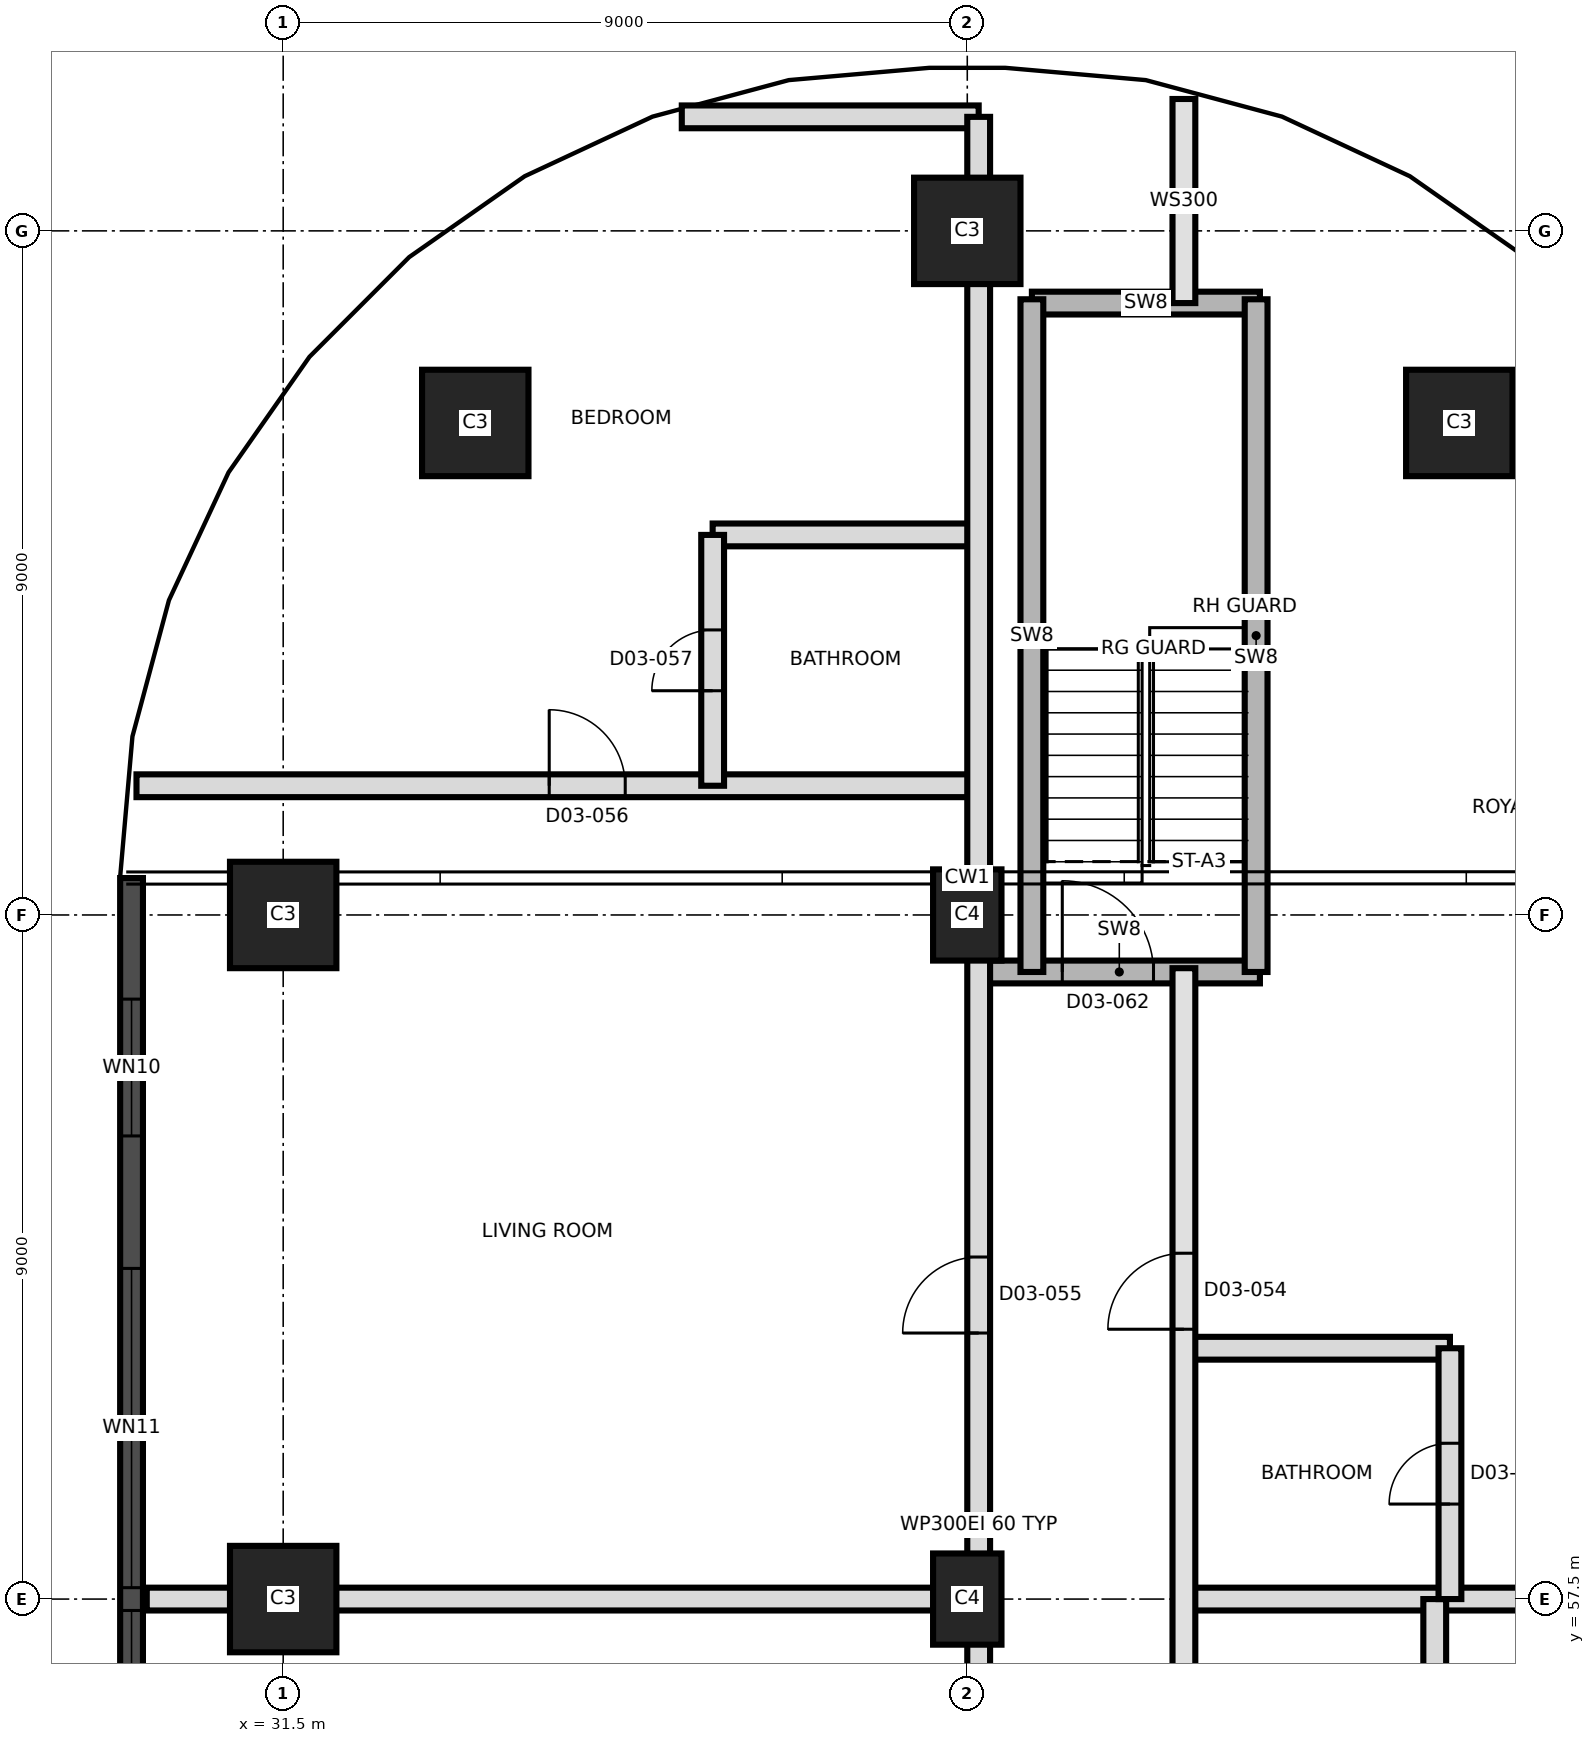
"""IFC4 building model, lengths in metres.
Left out: names, types, materials, properties, quantities, classifications, styles, units other than length and angle.
Written with IfcOpenShell. Run it as: python <this file> out.ifc"""

import sys

from ifc_helpers import new_model, si_unit, direction, frame, frame_2d, origin, origin_2d, place, context, subcontext, project, spatial, rectangle, extrude, element, fill, save


model = new_model("IFC4")
c1 = context("Model", 3, precision=1e-05, world=origin(), true_north=direction((0.0, 1.0)))
c2 = subcontext(c1, "Body", "Model", "MODEL_VIEW")
j1 = project(units=[si_unit("LENGTHUNIT", "METRE"), si_unit("PLANEANGLEUNIT", "RADIAN")], contexts=[c1])
p1 = place(None, origin())
s1 = spatial("IfcSite", under=j1, at=p1, CompositionType="ELEMENT")
p2 = place(p1, origin())
s2 = spatial("IfcBuilding", under=s1, at=p2, CompositionType="ELEMENT")
p3 = place(p2, frame((0.0, 0.0, 52.0)))
s3 = spatial("IfcBuildingStorey", under=s2, at=p3, CompositionType="ELEMENT", Elevation=52.0)
p4 = place(p3, frame((31.5, 57.5, 0.0), z_axis=(0.0, 0.0, 1.0), x_axis=(1.0, 0.0, 0.0)))
e1 = element("IfcColumn", 1, at=p4, inside=s3, PredefinedType="COLUMN", context=c2, shape_type="SweptSolid", body=[
    extrude(rectangle(XDim=1.4, YDim=1.4, at=origin_2d()), origin(), (0.0, 0.0, 1.0), 3.7),
])
p5 = place(p3, frame((40.5, 57.5, 0.0), z_axis=(0.0, 0.0, 1.0), x_axis=(0.0, 1.0, 0.0)))
e2 = element("IfcColumn", 2, at=p5, inside=s3, PredefinedType="COLUMN", context=c2, shape_type="SweptSolid", body=[
    extrude(rectangle(XDim=1.2, YDim=0.9, at=origin_2d()), origin(), (0.0, 0.0, 1.0), 3.7),
])
p6 = place(p3, frame((31.5, 66.5, 0.0), z_axis=(0.0, 0.0, 1.0), x_axis=(1.0, 0.0, 0.0)))
e3 = element("IfcColumn", 3, at=p6, inside=s3, PredefinedType="COLUMN", context=c2, shape_type="SweptSolid", body=[
    extrude(rectangle(XDim=1.4, YDim=1.4, at=origin_2d()), origin(), (0.0, 0.0, 1.0), 3.7),
])
p7 = place(p3, frame((40.5, 66.5, 0.0), z_axis=(0.0, 0.0, 1.0), x_axis=(0.0, 1.0, 0.0)))
e4 = element("IfcColumn", 4, at=p7, inside=s3, PredefinedType="COLUMN", context=c2, shape_type="SweptSolid", body=[
    extrude(rectangle(XDim=1.2, YDim=0.9, at=origin_2d()), origin(), (0.0, 0.0, 1.0), 3.7),
])
for number, where, z_axis, x_axis in (
    (5, (34.027, 72.973, 0.0), (0.0, 0.0, 1.0), (1.0, 0.0, 0.0)),
    (6, (46.973, 72.973, 0.0), (0.0, 0.0, 1.0), (1.0, 0.0, 0.0)),
    (7, (40.5, 75.5, 0.0), (0.0, 0.0, 1.0), (1.0, 0.0, 0.0)),
):
    element("IfcColumn", number, at=place(p3, frame(where, z_axis=z_axis, x_axis=x_axis)), inside=s3, PredefinedType="COLUMN", context=c2, shape_type="SweptSolid", body=[
        extrude(rectangle(XDim=1.4, YDim=1.4, at=origin_2d()), origin(), (0.0, 0.0, 1.0), 3.7),
    ])
p8 = place(p3, frame((29.505, 66.986, 0.0), z_axis=(0.0, 0.0, 1.0), x_axis=(0.0, -1.0, 0.0)))
e8 = element("IfcWall", 8, at=p8, inside=s3, PredefinedType="SOLIDWALL", context=c2, shape_type="SweptSolid", body=[
    extrude(rectangle(XDim=32.976, YDim=0.3, at=frame_2d((16.488, 0.0))), origin(), (0.0, 0.0, 1.0), 3.4),
])
p9 = place(p8, frame((1.593, 0.0, 0.3)))
e9 = element("IfcOpeningElement", 9, at=p9, cuts=e8, PredefinedType="OPENING", context=c2, shape_type="SweptSolid", body=[
    extrude(rectangle(XDim=1.8, YDim=2.4, at=frame_2d((0.9, 1.2))), frame((0.0, 0.16, 0.0), z_axis=(0.0, -1.0, 0.0), x_axis=(1.0, 0.0, 0.0)), (0.0, 0.0, 1.0), 0.32),
])
p10 = place(p8, frame((5.136, 0.0, 0.9)))
e10 = element("IfcOpeningElement", 10, at=p10, cuts=e8, PredefinedType="OPENING", context=c2, shape_type="SweptSolid", body=[
    extrude(rectangle(XDim=4.2, YDim=1.5, at=frame_2d((2.1, 0.75))), frame((0.0, 0.16, 0.0), z_axis=(0.0, -1.0, 0.0), x_axis=(1.0, 0.0, 0.0)), (0.0, 0.0, 1.0), 0.32),
])
p11 = place(p8, frame((9.636, 0.0, 0.9)))
e11 = element("IfcOpeningElement", 11, at=p11, cuts=e8, PredefinedType="OPENING", context=c2, shape_type="SweptSolid", body=[
    extrude(rectangle(XDim=4.2, YDim=1.5, at=frame_2d((2.1, 0.75))), frame((0.0, 0.16, 0.0), z_axis=(0.0, -1.0, 0.0), x_axis=(1.0, 0.0, 0.0)), (0.0, 0.0, 1.0), 0.32),
])
p12 = place(p8, frame((14.136, 0.0, 0.9)))
e12 = element("IfcOpeningElement", 12, at=p12, cuts=e8, PredefinedType="OPENING", context=c2, shape_type="SweptSolid", body=[
    extrude(rectangle(XDim=4.2, YDim=1.5, at=frame_2d((2.1, 0.75))), frame((0.0, 0.16, 0.0), z_axis=(0.0, -1.0, 0.0), x_axis=(1.0, 0.0, 0.0)), (0.0, 0.0, 1.0), 0.32),
])
p13 = place(p8, frame((18.636, 0.0, 0.9)))
e13 = element("IfcOpeningElement", 13, at=p13, cuts=e8, PredefinedType="OPENING", context=c2, shape_type="SweptSolid", body=[
    extrude(rectangle(XDim=4.2, YDim=1.5, at=frame_2d((2.1, 0.75))), frame((0.0, 0.16, 0.0), z_axis=(0.0, -1.0, 0.0), x_axis=(1.0, 0.0, 0.0)), (0.0, 0.0, 1.0), 0.32),
])
p14 = place(p8, frame((23.136, 0.0, 0.9)))
e14 = element("IfcOpeningElement", 14, at=p14, cuts=e8, PredefinedType="OPENING", context=c2, shape_type="SweptSolid", body=[
    extrude(rectangle(XDim=4.2, YDim=1.5, at=frame_2d((2.1, 0.75))), frame((0.0, 0.16, 0.0), z_axis=(0.0, -1.0, 0.0), x_axis=(1.0, 0.0, 0.0)), (0.0, 0.0, 1.0), 0.32),
])
p15 = place(p8, frame((29.331, 0.0, 0.3)))
e15 = element("IfcOpeningElement", 15, at=p15, cuts=e8, PredefinedType="OPENING", context=c2, shape_type="SweptSolid", body=[
    extrude(rectangle(XDim=1.8, YDim=2.4, at=frame_2d((0.9, 1.2))), frame((0.0, 0.16, 0.0), z_axis=(0.0, -1.0, 0.0), x_axis=(1.0, 0.0, 0.0)), (0.0, 0.0, 1.0), 0.32),
])
p16 = place(p3, frame((29.705, 57.5, 0.0), z_axis=(0.0, 0.0, 1.0), x_axis=(1.0, 0.0, 0.0)))
e16 = element("IfcWall", 16, at=p16, inside=s3, PredefinedType="PARTITIONING", context=c2, shape_type="SweptSolid", body=[
    extrude(rectangle(XDim=10.945, YDim=0.3, at=frame_2d((5.472, 0.0))), origin(), (0.0, 0.0, 1.0), 3.4),
])
p17 = place(p3, frame((43.35, 57.5, 0.0), z_axis=(0.0, 0.0, 1.0), x_axis=(1.0, 0.0, 0.0)))
e17 = element("IfcWall", 17, at=p17, inside=s3, PredefinedType="PARTITIONING", context=c2, shape_type="SweptSolid", body=[
    extrude(rectangle(XDim=8.125, YDim=0.3, at=frame_2d((4.062, 0.0))), origin(), (0.0, 0.0, 1.0), 3.4),
])
p18 = place(p3, frame((43.35, 60.8, 0.0), z_axis=(0.0, 0.0, 1.0), x_axis=(1.0, 0.0, 0.0)))
e18 = element("IfcWall", 18, at=p18, inside=s3, PredefinedType="PARTITIONING", context=c2, shape_type="SweptSolid", body=[
    extrude(rectangle(XDim=3.5, YDim=0.3, at=frame_2d((1.75, 0.0))), origin(), (0.0, 0.0, 1.0), 3.4),
])
p19 = place(p3, frame((40.65, 65.75, 0.0), z_axis=(0.0, 0.0, 1.0), x_axis=(1.0, 0.0, 0.0)))
e19 = element("IfcWall", 19, at=p19, inside=s3, PredefinedType="SHEAR", context=c2, shape_type="SweptSolid", body=[
    extrude(rectangle(XDim=3.7, YDim=0.3, at=frame_2d((1.85, 0.0))), origin(), (0.0, 0.0, 1.0), 3.4),
])
p20 = place(p19, frame((1.1, 0.0, 0.0)))
e20 = element("IfcOpeningElement", 20, at=p20, cuts=e19, PredefinedType="OPENING", context=c2, shape_type="SweptSolid", body=[
    extrude(rectangle(XDim=1.2, YDim=2.1, at=frame_2d((0.6, 1.05))), frame((0.0, 0.16, 0.0), z_axis=(0.0, -1.0, 0.0), x_axis=(1.0, 0.0, 0.0)), (0.0, 0.0, 1.0), 0.32),
])
p21 = place(p3, frame((29.57, 68.2, 0.0), z_axis=(0.0, 0.0, 1.0), x_axis=(1.0, 0.0, 0.0)))
e21 = element("IfcWall", 21, at=p21, inside=s3, PredefinedType="PARTITIONING", context=c2, shape_type="SweptSolid", body=[
    extrude(rectangle(XDim=11.08, YDim=0.3, at=frame_2d((5.54, 0.0))), origin(), (0.0, 0.0, 1.0), 3.4),
])
p22 = place(p21, frame((5.43, 0.0, 0.0)))
e22 = element("IfcOpeningElement", 22, at=p22, cuts=e21, PredefinedType="OPENING", context=c2, shape_type="SweptSolid", body=[
    extrude(rectangle(XDim=1.0, YDim=2.1, at=frame_2d((0.5, 1.05))), frame((0.0, 0.16, 0.0), z_axis=(0.0, -1.0, 0.0), x_axis=(1.0, 0.0, 0.0)), (0.0, 0.0, 1.0), 0.32),
])
p23 = place(p3, frame((37.15, 71.5, 0.0), z_axis=(0.0, 0.0, 1.0), x_axis=(1.0, 0.0, 0.0)))
e23 = element("IfcWall", 23, at=p23, inside=s3, PredefinedType="PARTITIONING", context=c2, shape_type="SweptSolid", body=[
    extrude(rectangle(XDim=3.5, YDim=0.3, at=frame_2d((1.75, 0.0))), origin(), (0.0, 0.0, 1.0), 3.4),
])
p24 = place(p3, frame((41.35, 74.55, 0.0), z_axis=(0.0, 0.0, 1.0), x_axis=(1.0, 0.0, 0.0)))
e24 = element("IfcWall", 24, at=p24, inside=s3, PredefinedType="SHEAR", context=c2, shape_type="SweptSolid", body=[
    extrude(rectangle(XDim=3.0, YDim=0.3, at=frame_2d((1.5, 0.0))), origin(), (0.0, 0.0, 1.0), 3.4),
])
p25 = place(p3, frame((36.744, 77.0, 0.0), z_axis=(0.0, 0.0, 1.0), x_axis=(1.0, 0.0, 0.0)))
e25 = element("IfcWall", 25, at=p25, inside=s3, PredefinedType="PARTITIONING", context=c2, shape_type="SweptSolid", body=[
    extrude(rectangle(XDim=3.906, YDim=0.3, at=frame_2d((1.953, 0.0))), origin(), (0.0, 0.0, 1.0), 3.4),
])
p26 = place(p3, frame((37.15, 68.2, 0.0), z_axis=(0.0, 0.0, 1.0), x_axis=(0.0, 1.0, 0.0)))
e26 = element("IfcWall", 26, at=p26, inside=s3, PredefinedType="PARTITIONING", context=c2, shape_type="SweptSolid", body=[
    extrude(rectangle(XDim=3.3, YDim=0.3, at=frame_2d((1.65, 0.0))), origin(), (0.0, 0.0, 1.0), 3.4),
])
p27 = place(p26, frame((1.25, 0.0, 0.0)))
e27 = element("IfcOpeningElement", 27, at=p27, cuts=e26, PredefinedType="OPENING", context=c2, shape_type="SweptSolid", body=[
    extrude(rectangle(XDim=0.8, YDim=2.1, at=frame_2d((0.4, 1.05))), frame((0.0, 0.16, 0.0), z_axis=(0.0, -1.0, 0.0), x_axis=(1.0, 0.0, 0.0)), (0.0, 0.0, 1.0), 0.32),
])
p28 = place(p3, frame((40.65, 39.95, 0.0), z_axis=(0.0, 0.0, 1.0), x_axis=(0.0, 1.0, 0.0)))
e28 = element("IfcWall", 28, at=p28, inside=s3, PredefinedType="PARTITIONING", context=c2, shape_type="SweptSolid", body=[
    extrude(rectangle(XDim=37.05, YDim=0.3, at=frame_2d((18.525, 0.0))), origin(), (0.0, 0.0, 1.0), 3.4),
])
p29 = place(p28, frame((1.9, 0.0, 0.0)))
e29 = element("IfcOpeningElement", 29, at=p29, cuts=e28, PredefinedType="OPENING", context=c2, shape_type="SweptSolid", body=[
    extrude(rectangle(XDim=1.0, YDim=2.4, at=frame_2d((0.5, 1.2))), frame((0.0, 0.16, 0.0), z_axis=(0.0, -1.0, 0.0), x_axis=(1.0, 0.0, 0.0)), (0.0, 0.0, 1.0), 0.32),
])
p30 = place(p28, frame((14.2, 0.0, 0.0)))
e30 = element("IfcOpeningElement", 30, at=p30, cuts=e28, PredefinedType="OPENING", context=c2, shape_type="SweptSolid", body=[
    extrude(rectangle(XDim=1.0, YDim=2.4, at=frame_2d((0.5, 1.2))), frame((0.0, 0.16, 0.0), z_axis=(0.0, -1.0, 0.0), x_axis=(1.0, 0.0, 0.0)), (0.0, 0.0, 1.0), 0.32),
])
p31 = place(p28, frame((21.05, 0.0, 0.0)))
e31 = element("IfcOpeningElement", 31, at=p31, cuts=e28, PredefinedType="OPENING", context=c2, shape_type="SweptSolid", body=[
    extrude(rectangle(XDim=1.0, YDim=2.4, at=frame_2d((0.5, 1.2))), frame((0.0, 0.16, 0.0), z_axis=(0.0, -1.0, 0.0), x_axis=(1.0, 0.0, 0.0)), (0.0, 0.0, 1.0), 0.32),
])
p32 = place(p3, frame((41.35, 65.75, 0.0), z_axis=(0.0, 0.0, 1.0), x_axis=(0.0, 1.0, 0.0)))
e32 = element("IfcWall", 32, at=p32, inside=s3, PredefinedType="SHEAR", context=c2, shape_type="SweptSolid", body=[
    extrude(rectangle(XDim=8.85, YDim=0.3, at=frame_2d((4.425, 0.0))), origin(), (0.0, 0.0, 1.0), 3.4),
])
p33 = place(p3, frame((43.35, 39.95, 0.0), z_axis=(0.0, 0.0, 1.0), x_axis=(0.0, 1.0, 0.0)))
e33 = element("IfcWall", 33, at=p33, inside=s3, PredefinedType="SOLIDWALL", context=c2, shape_type="SweptSolid", body=[
    extrude(rectangle(XDim=25.85, YDim=0.3, at=frame_2d((12.925, 0.0))), origin(), (0.0, 0.0, 1.0), 3.4),
])
p34 = place(p33, frame((0.7, 0.0, 0.0)))
e34 = element("IfcOpeningElement", 34, at=p34, cuts=e33, PredefinedType="OPENING", context=c2, shape_type="SweptSolid", body=[
    extrude(rectangle(XDim=1.0, YDim=2.1, at=frame_2d((0.5, 1.05))), frame((0.0, 0.16, 0.0), z_axis=(0.0, -1.0, 0.0), x_axis=(1.0, 0.0, 0.0)), (0.0, 0.0, 1.0), 0.32),
])
p35 = place(p33, frame((6.55, 0.0, 0.0)))
e35 = element("IfcOpeningElement", 35, at=p35, cuts=e33, PredefinedType="OPENING", context=c2, shape_type="SweptSolid", body=[
    extrude(rectangle(XDim=1.0, YDim=2.1, at=frame_2d((0.5, 1.05))), frame((0.0, 0.16, 0.0), z_axis=(0.0, -1.0, 0.0), x_axis=(1.0, 0.0, 0.0)), (0.0, 0.0, 1.0), 0.32),
])
p36 = place(p33, frame((12.55, 0.0, 0.0)))
e36 = element("IfcOpeningElement", 36, at=p36, cuts=e33, PredefinedType="OPENING", context=c2, shape_type="SweptSolid", body=[
    extrude(rectangle(XDim=1.0, YDim=2.4, at=frame_2d((0.5, 1.2))), frame((0.0, 0.16, 0.0), z_axis=(0.0, -1.0, 0.0), x_axis=(1.0, 0.0, 0.0)), (0.0, 0.0, 1.0), 0.32),
])
p37 = place(p33, frame((21.1, 0.0, 0.0)))
e37 = element("IfcOpeningElement", 37, at=p37, cuts=e33, PredefinedType="OPENING", context=c2, shape_type="SweptSolid", body=[
    extrude(rectangle(XDim=1.0, YDim=2.4, at=frame_2d((0.5, 1.2))), frame((0.0, 0.16, 0.0), z_axis=(0.0, -1.0, 0.0), x_axis=(1.0, 0.0, 0.0)), (0.0, 0.0, 1.0), 0.32),
])
p38 = place(p3, frame((43.35, 74.55, 0.0), z_axis=(0.0, 0.0, 1.0), x_axis=(0.0, 1.0, 0.0)))
e38 = element("IfcWall", 38, at=p38, inside=s3, PredefinedType="SOLIDWALL", context=c2, shape_type="SweptSolid", body=[
    extrude(rectangle(XDim=2.685, YDim=0.3, at=frame_2d((1.343, 0.0))), origin(), (0.0, 0.0, 1.0), 3.4),
])
p39 = place(p3, frame((44.3, 65.75, 0.0), z_axis=(0.0, 0.0, 1.0), x_axis=(0.0, 1.0, 0.0)))
e39 = element("IfcWall", 39, at=p39, inside=s3, PredefinedType="SHEAR", context=c2, shape_type="SweptSolid", body=[
    extrude(rectangle(XDim=8.85, YDim=0.3, at=frame_2d((4.425, 0.0))), origin(), (0.0, 0.0, 1.0), 3.4),
])
p40 = place(p3, frame((46.65, 54.5, 0.0), z_axis=(0.0, 0.0, 1.0), x_axis=(0.0, 1.0, 0.0)))
e40 = element("IfcWall", 40, at=p40, inside=s3, PredefinedType="PARTITIONING", context=c2, shape_type="SweptSolid", body=[
    extrude(rectangle(XDim=3.0, YDim=0.3, at=frame_2d((1.5, 0.0))), origin(), (0.0, 0.0, 1.0), 3.4),
])
p41 = place(p40, frame((1.1, 0.0, 0.0)))
e41 = element("IfcOpeningElement", 41, at=p41, cuts=e40, PredefinedType="OPENING", context=c2, shape_type="SweptSolid", body=[
    extrude(rectangle(XDim=0.8, YDim=2.1, at=frame_2d((0.4, 1.05))), frame((0.0, 0.16, 0.0), z_axis=(0.0, -1.0, 0.0), x_axis=(1.0, 0.0, 0.0)), (0.0, 0.0, 1.0), 0.32),
])
p42 = place(p3, frame((46.85, 57.5, 0.0), z_axis=(0.0, 0.0, 1.0), x_axis=(0.0, 1.0, 0.0)))
e42 = element("IfcWall", 42, at=p42, inside=s3, PredefinedType="PARTITIONING", context=c2, shape_type="SweptSolid", body=[
    extrude(rectangle(XDim=3.3, YDim=0.3, at=frame_2d((1.65, 0.0))), origin(), (0.0, 0.0, 1.0), 3.4),
])
p43 = place(p42, frame((1.25, 0.0, 0.0)))
e43 = element("IfcOpeningElement", 43, at=p43, cuts=e42, PredefinedType="OPENING", context=c2, shape_type="SweptSolid", body=[
    extrude(rectangle(XDim=0.8, YDim=2.1, at=frame_2d((0.4, 1.05))), frame((0.0, 0.16, 0.0), z_axis=(0.0, -1.0, 0.0), x_axis=(1.0, 0.0, 0.0)), (0.0, 0.0, 1.0), 0.32),
])
p44 = place(p9, origin())
e44 = element("IfcWindow", 44, at=p44, inside=s3, PartitioningType="SINGLE_PANEL", PredefinedType="WINDOW", context=c2, shape_type="SweptSolid", body=[
    extrude(rectangle(XDim=1.8, YDim=2.4, at=frame_2d((0.9, 1.2))), frame((0.0, 0.03, 0.0), z_axis=(0.0, -1.0, 0.0), x_axis=(1.0, 0.0, 0.0)), (0.0, 0.0, 1.0), 0.06),
])
fill(e9, e44)
p45 = place(p10, origin())
e45 = element("IfcWindow", 45, at=p45, inside=s3, PartitioningType="SINGLE_PANEL", PredefinedType="WINDOW", context=c2, shape_type="SweptSolid", body=[
    extrude(rectangle(XDim=4.2, YDim=1.5, at=frame_2d((2.1, 0.75))), frame((0.0, 0.03, 0.0), z_axis=(0.0, -1.0, 0.0), x_axis=(1.0, 0.0, 0.0)), (0.0, 0.0, 1.0), 0.06),
])
fill(e10, e45)
p46 = place(p11, origin())
e46 = element("IfcWindow", 46, at=p46, inside=s3, PartitioningType="SINGLE_PANEL", PredefinedType="WINDOW", context=c2, shape_type="SweptSolid", body=[
    extrude(rectangle(XDim=4.2, YDim=1.5, at=frame_2d((2.1, 0.75))), frame((0.0, 0.03, 0.0), z_axis=(0.0, -1.0, 0.0), x_axis=(1.0, 0.0, 0.0)), (0.0, 0.0, 1.0), 0.06),
])
fill(e11, e46)
p47 = place(p43, origin())
e47 = element("IfcDoor", 47, at=p47, inside=s3, OperationType="SINGLE_SWING_LEFT", PredefinedType="DOOR", context=c2, shape_type="SweptSolid", body=[
    extrude(rectangle(XDim=0.8, YDim=2.1, at=frame_2d((0.4, 1.05))), frame((0.0, 0.025, 0.0), z_axis=(0.0, -1.0, 0.0), x_axis=(1.0, 0.0, 0.0)), (0.0, 0.0, 1.0), 0.05),
])
fill(e43, e47)
p48 = place(p37, origin())
e48 = element("IfcDoor", 48, at=p48, inside=s3, OperationType="SINGLE_SWING_LEFT", PredefinedType="DOOR", context=c2, shape_type="SweptSolid", body=[
    extrude(rectangle(XDim=1.0, YDim=2.4, at=frame_2d((0.5, 1.2))), frame((0.0, 0.025, 0.0), z_axis=(0.0, -1.0, 0.0), x_axis=(1.0, 0.0, 0.0)), (0.0, 0.0, 1.0), 0.05),
])
fill(e37, e48)
p49 = place(p31, origin())
e49 = element("IfcDoor", 49, at=p49, inside=s3, OperationType="SINGLE_SWING_RIGHT", PredefinedType="DOOR", context=c2, shape_type="SweptSolid", body=[
    extrude(rectangle(XDim=1.0, YDim=2.4, at=frame_2d((0.5, 1.2))), frame((0.0, 0.025, 0.0), z_axis=(0.0, -1.0, 0.0), x_axis=(1.0, 0.0, 0.0)), (0.0, 0.0, 1.0), 0.05),
])
fill(e31, e49)
p50 = place(p22, origin())
e50 = element("IfcDoor", 50, at=p50, inside=s3, OperationType="SINGLE_SWING_LEFT", PredefinedType="DOOR", context=c2, shape_type="SweptSolid", body=[
    extrude(rectangle(XDim=1.0, YDim=2.1, at=frame_2d((0.5, 1.05))), frame((0.0, 0.025, 0.0), z_axis=(0.0, -1.0, 0.0), x_axis=(1.0, 0.0, 0.0)), (0.0, 0.0, 1.0), 0.05),
])
fill(e22, e50)
p51 = place(p27, origin())
e51 = element("IfcDoor", 51, at=p51, inside=s3, OperationType="SINGLE_SWING_LEFT", PredefinedType="DOOR", context=c2, shape_type="SweptSolid", body=[
    extrude(rectangle(XDim=0.8, YDim=2.1, at=frame_2d((0.4, 1.05))), frame((0.0, 0.025, 0.0), z_axis=(0.0, -1.0, 0.0), x_axis=(1.0, 0.0, 0.0)), (0.0, 0.0, 1.0), 0.05),
])
fill(e27, e51)
p52 = place(p20, origin())
e52 = element("IfcDoor", 52, at=p52, inside=s3, OperationType="SINGLE_SWING_RIGHT", PredefinedType="DOOR", context=c2, shape_type="SweptSolid", body=[
    extrude(rectangle(XDim=1.2, YDim=2.1, at=frame_2d((0.6, 1.05))), frame((0.0, 0.025, 0.0), z_axis=(0.0, -1.0, 0.0), x_axis=(1.0, 0.0, 0.0)), (0.0, 0.0, 1.0), 0.05),
])
fill(e20, e52)
save(model, sys.argv[1])
